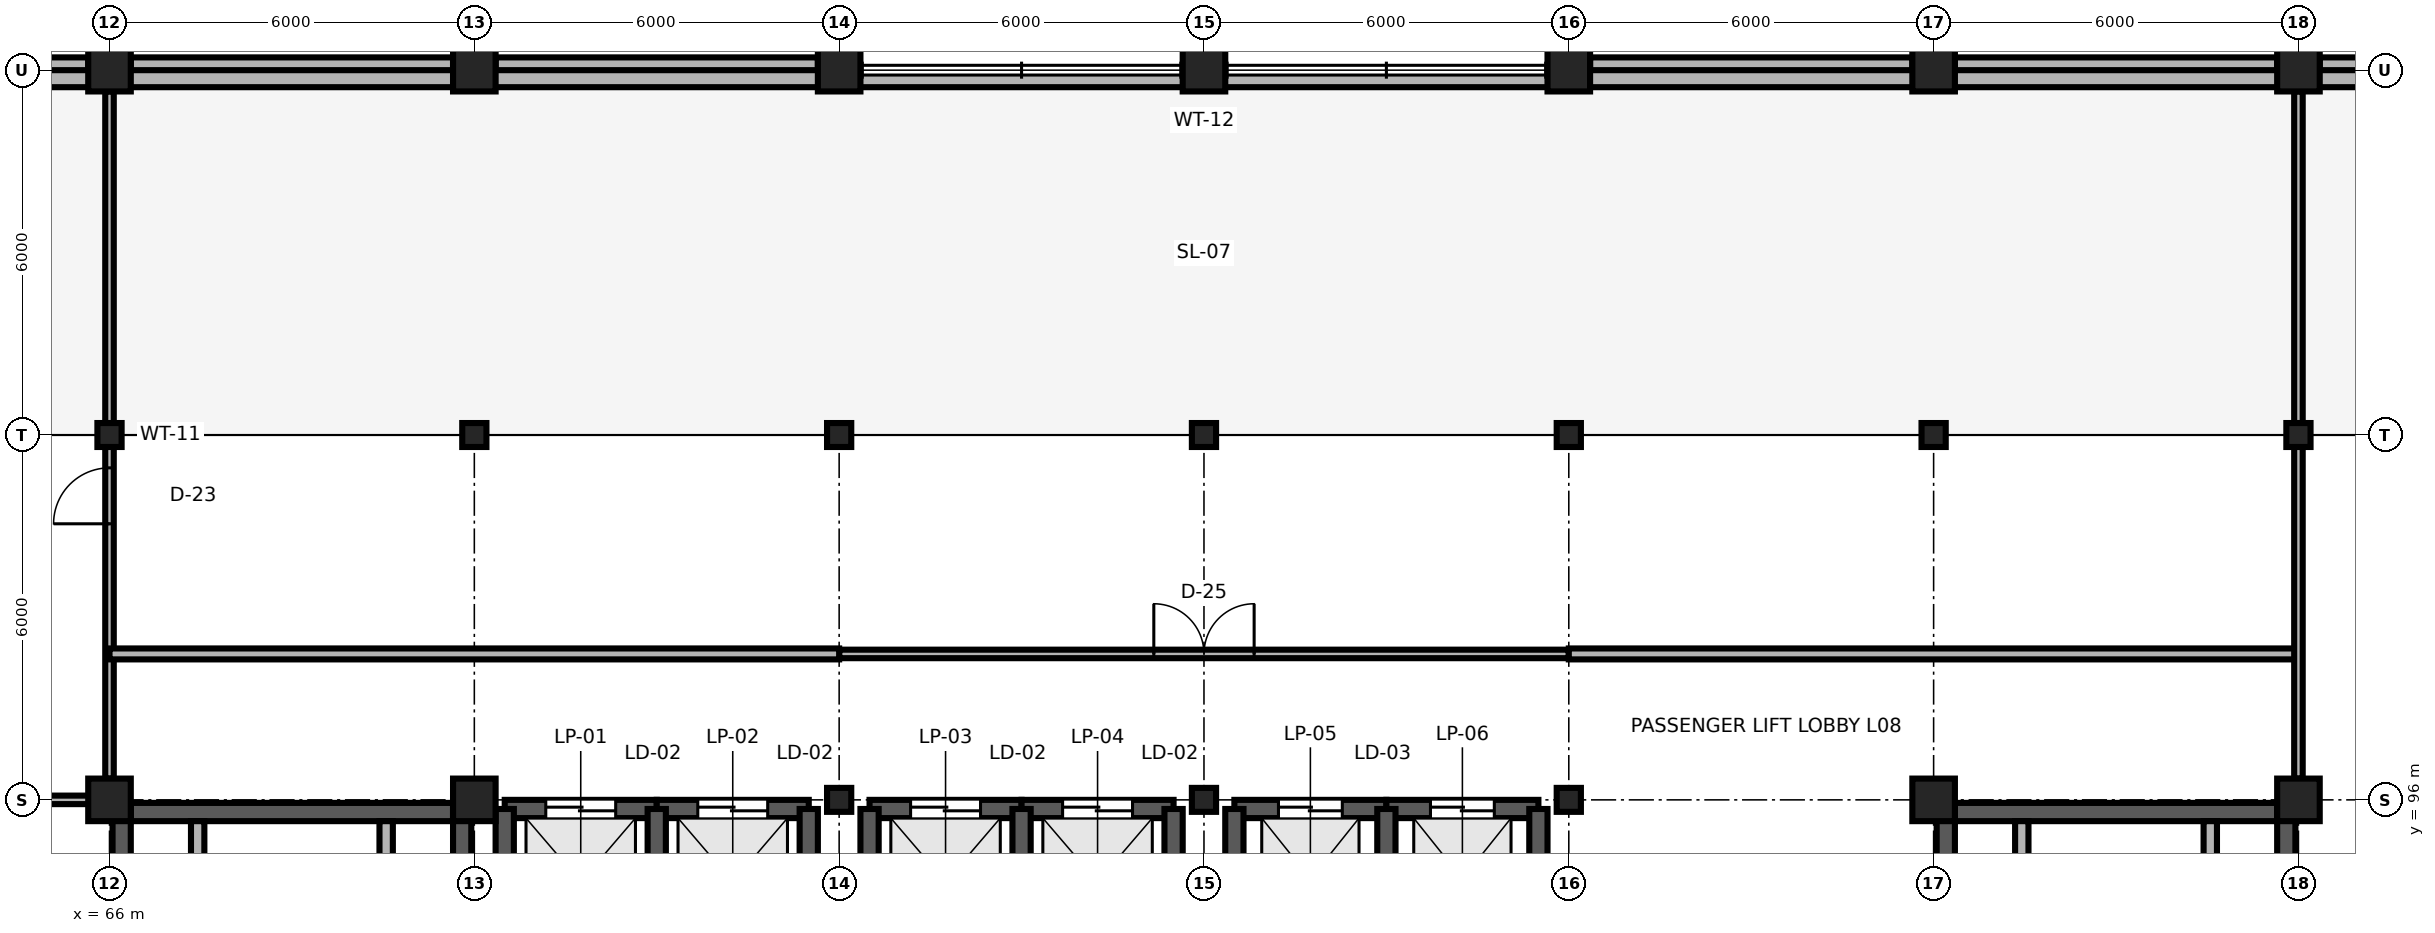
"""IFC4 building model, lengths in metres.
Left out: names, types, materials, properties, quantities, classifications, styles, units other than length and angle.
Written with IfcOpenShell. Run it as: python <this file> out.ifc"""

import sys

from ifc_helpers import new_model, si_unit, direction, frame, frame_2d, origin, origin_2d, place, context, subcontext, project, spatial, rectangle, i_section, extrude, element, fill, save


model = new_model("IFC4")
c1 = context("Model", 3, precision=1e-05, world=origin(), true_north=direction((0.0, 1.0)))
c2 = subcontext(c1, "Body", "Model", "MODEL_VIEW")
j1 = project(units=[si_unit("LENGTHUNIT", "METRE"), si_unit("PLANEANGLEUNIT", "RADIAN")], contexts=[c1])
p1 = place(None, origin())
s1 = spatial("IfcSite", under=j1, at=p1, CompositionType="ELEMENT")
p2 = place(p1, origin())
s2 = spatial("IfcBuilding", under=s1, at=p2, CompositionType="ELEMENT")
p3 = place(p2, frame((0.0, 0.0, 32.7)))
s3 = spatial("IfcBuildingStorey", under=s2, at=p3, CompositionType="ELEMENT", Elevation=32.7)
for number, where, z_axis, x_axis in (
    (1, (66.0, 96.0, 0.0), (0.0, 0.0, 1.0), (1.0, 0.0, 0.0)),
    (2, (72.0, 96.0, 0.0), (0.0, 0.0, 1.0), (1.0, 0.0, 0.0)),
):
    element("IfcColumn", number, at=place(p3, frame(where, z_axis=z_axis, x_axis=x_axis)), inside=s3, PredefinedType="COLUMN", context=c2, shape_type="SweptSolid", body=[
        extrude(rectangle(XDim=0.7, YDim=0.7, at=origin_2d()), origin(), (0.0, 0.0, 1.0), 3.9),
    ])
for number, where, z_axis, x_axis in (
    (3, (78.0, 96.0, 0.0), (0.0, 0.0, 1.0), (1.0, 0.0, 0.0)),
    (4, (84.0, 96.0, 0.0), (0.0, 0.0, 1.0), (1.0, 0.0, 0.0)),
    (5, (90.0, 96.0, 0.0), (0.0, 0.0, 1.0), (1.0, 0.0, 0.0)),
):
    element("IfcColumn", number, at=place(p3, frame(where, z_axis=z_axis, x_axis=x_axis)), inside=s3, PredefinedType="COLUMN", context=c2, shape_type="SweptSolid", body=[
        extrude(i_section(OverallWidth=0.398, OverallDepth=0.394, WebThickness=0.011, FlangeThickness=0.018, FilletRadius=0.022, at=origin_2d()), origin(), (0.0, 0.0, 1.0), 3.9),
    ])
for number, where, z_axis, x_axis in (
    (6, (96.0, 96.0, 0.0), (0.0, 0.0, 1.0), (1.0, 0.0, 0.0)),
    (7, (102.0, 96.0, 0.0), (0.0, 0.0, 1.0), (1.0, 0.0, 0.0)),
):
    element("IfcColumn", number, at=place(p3, frame(where, z_axis=z_axis, x_axis=x_axis)), inside=s3, PredefinedType="COLUMN", context=c2, shape_type="SweptSolid", body=[
        extrude(rectangle(XDim=0.7, YDim=0.7, at=origin_2d()), origin(), (0.0, 0.0, 1.0), 3.9),
    ])
for number, where, z_axis, x_axis in (
    (8, (66.0, 102.0, 0.0), (0.0, 0.0, 1.0), (1.0, 0.0, 0.0)),
    (9, (72.0, 102.0, 0.0), (0.0, 0.0, 1.0), (1.0, 0.0, 0.0)),
    (10, (78.0, 102.0, 0.0), (0.0, 0.0, 1.0), (1.0, 0.0, 0.0)),
    (11, (84.0, 102.0, 0.0), (0.0, 0.0, 1.0), (1.0, 0.0, 0.0)),
    (12, (90.0, 102.0, 0.0), (0.0, 0.0, 1.0), (1.0, 0.0, 0.0)),
    (13, (96.0, 102.0, 0.0), (0.0, 0.0, 1.0), (1.0, 0.0, 0.0)),
    (14, (102.0, 102.0, 0.0), (0.0, 0.0, 1.0), (1.0, 0.0, 0.0)),
):
    element("IfcColumn", number, at=place(p3, frame(where, z_axis=z_axis, x_axis=x_axis)), inside=s3, PredefinedType="COLUMN", context=c2, shape_type="SweptSolid", body=[
        extrude(i_section(OverallWidth=0.398, OverallDepth=0.394, WebThickness=0.011, FlangeThickness=0.018, FilletRadius=0.022, at=origin_2d()), origin(), (0.0, 0.0, 1.0), 3.9),
    ])
for number, where, z_axis, x_axis in (
    (15, (66.0, 108.0, 0.0), (0.0, 0.0, 1.0), (1.0, 0.0, 0.0)),
    (16, (72.0, 108.0, 0.0), (0.0, 0.0, 1.0), (1.0, 0.0, 0.0)),
    (17, (78.0, 108.0, 0.0), (0.0, 0.0, 1.0), (1.0, 0.0, 0.0)),
    (18, (84.0, 108.0, 0.0), (0.0, 0.0, 1.0), (1.0, 0.0, 0.0)),
    (19, (90.0, 108.0, 0.0), (0.0, 0.0, 1.0), (1.0, 0.0, 0.0)),
    (20, (96.0, 108.0, 0.0), (0.0, 0.0, 1.0), (1.0, 0.0, 0.0)),
    (21, (102.0, 108.0, 0.0), (0.0, 0.0, 1.0), (1.0, 0.0, 0.0)),
):
    element("IfcColumn", number, at=place(p3, frame(where, z_axis=z_axis, x_axis=x_axis)), inside=s3, PredefinedType="COLUMN", context=c2, shape_type="SweptSolid", body=[
        extrude(rectangle(XDim=0.7, YDim=0.7, at=origin_2d()), origin(), (0.0, 0.0, 1.0), 3.4),
    ])
for number, where, z_axis, x_axis in (
    (22, (60.35, 108.0, 0.0), (0.0, 0.0, 1.0), (1.0, 0.0, 0.0)),
    (23, (66.35, 108.0, 0.0), (0.0, 0.0, 1.0), (1.0, 0.0, 0.0)),
    (24, (72.35, 108.0, 0.0), (0.0, 0.0, 1.0), (1.0, 0.0, 0.0)),
    (25, (90.35, 108.0, 0.0), (0.0, 0.0, 1.0), (1.0, 0.0, 0.0)),
    (26, (96.35, 108.0, 0.0), (0.0, 0.0, 1.0), (1.0, 0.0, 0.0)),
    (27, (102.35, 108.0, 0.0), (0.0, 0.0, 1.0), (1.0, 0.0, 0.0)),
):
    element("IfcWall", number, at=place(p3, frame(where, z_axis=z_axis, x_axis=x_axis)), inside=s3, PredefinedType="SOLIDWALL", context=c2, shape_type="SweptSolid", body=[
        extrude(rectangle(XDim=5.3, YDim=0.42, at=frame_2d((2.65, 0.0))), origin(), (0.0, 0.0, 1.0), 2.98),
    ])
p4 = place(p3, frame((54.0, 107.86, 3.6), z_axis=(0.0, 0.0, 1.0), x_axis=(1.0, 0.0, 0.0)))
e28 = element("IfcWall", 28, at=p4, inside=s3, PredefinedType="PARAPET", context=c2, shape_type="SweptSolid", body=[
    extrude(rectangle(XDim=60.0, YDim=0.28, at=frame_2d((30.0, 0.0))), origin(), (0.0, 0.0, 1.0), 0.85),
])
p5 = place(p3, frame((66.35, 95.8, 0.0), z_axis=(0.0, 0.0, 1.0), x_axis=(1.0, 0.0, 0.0)))
e29 = element("IfcWall", 29, at=p5, inside=s3, PredefinedType="SHEAR", context=c2, shape_type="SweptSolid", body=[
    extrude(rectangle(XDim=5.3, YDim=0.3, at=frame_2d((2.65, 0.0))), origin(), (0.0, 0.0, 1.0), 3.74),
])
for number, where, z_axis, x_axis in (
    (30, (66.2, 84.0, 0.0), (0.0, 0.0, 1.0), (0.0, 1.0, 0.0)),
    (31, (71.8, 84.0, 0.0), (0.0, 0.0, 1.0), (0.0, 1.0, 0.0)),
):
    element("IfcWall", number, at=place(p3, frame(where, z_axis=z_axis, x_axis=x_axis)), inside=s3, PredefinedType="SHEAR", context=c2, shape_type="SweptSolid", body=[
        extrude(rectangle(XDim=11.8, YDim=0.3, at=frame_2d((5.9, 0.0))), origin(), (0.0, 0.0, 1.0), 3.74),
    ])
for number, where, z_axis, x_axis in (
    (32, (67.45, 94.4, 0.0), (0.0, 0.0, 1.0), (0.0, 1.0, 0.0)),
    (33, (70.55, 94.4, 0.0), (0.0, 0.0, 1.0), (0.0, 1.0, 0.0)),
):
    element("IfcWall", number, at=place(p3, frame(where, z_axis=z_axis, x_axis=x_axis)), inside=s3, PredefinedType="PARTITIONING", context=c2, shape_type="SweptSolid", body=[
        extrude(rectangle(XDim=1.25, YDim=0.22, at=frame_2d((0.625, 0.0))), origin(), (0.0, 0.0, 1.0), 3.74),
    ])
p6 = place(p3, frame((96.35, 95.8, 0.0), z_axis=(0.0, 0.0, 1.0), x_axis=(1.0, 0.0, 0.0)))
e34 = element("IfcWall", 34, at=p6, inside=s3, PredefinedType="SHEAR", context=c2, shape_type="SweptSolid", body=[
    extrude(rectangle(XDim=5.3, YDim=0.3, at=frame_2d((2.65, 0.0))), origin(), (0.0, 0.0, 1.0), 3.74),
])
for number, where, z_axis, x_axis in (
    (35, (96.2, 84.0, 0.0), (0.0, 0.0, 1.0), (0.0, 1.0, 0.0)),
    (36, (101.8, 84.0, 0.0), (0.0, 0.0, 1.0), (0.0, 1.0, 0.0)),
):
    element("IfcWall", number, at=place(p3, frame(where, z_axis=z_axis, x_axis=x_axis)), inside=s3, PredefinedType="SHEAR", context=c2, shape_type="SweptSolid", body=[
        extrude(rectangle(XDim=11.8, YDim=0.3, at=frame_2d((5.9, 0.0))), origin(), (0.0, 0.0, 1.0), 3.74),
    ])
for number, where, z_axis, x_axis in (
    (37, (97.45, 94.4, 0.0), (0.0, 0.0, 1.0), (0.0, 1.0, 0.0)),
    (38, (100.55, 94.4, 0.0), (0.0, 0.0, 1.0), (0.0, 1.0, 0.0)),
):
    element("IfcWall", number, at=place(p3, frame(where, z_axis=z_axis, x_axis=x_axis)), inside=s3, PredefinedType="PARTITIONING", context=c2, shape_type="SweptSolid", body=[
        extrude(rectangle(XDim=1.25, YDim=0.22, at=frame_2d((0.625, 0.0))), origin(), (0.0, 0.0, 1.0), 3.74),
    ])
p7 = place(p3, frame((72.5, 95.85, 0.0), z_axis=(0.0, 0.0, 1.0), x_axis=(1.0, 0.0, 0.0)))
e39 = element("IfcWall", 39, at=p7, inside=s3, PredefinedType="SHEAR", context=c2, shape_type="SweptSolid", body=[
    extrude(rectangle(XDim=2.5, YDim=0.3, at=frame_2d((1.25, 0.0))), origin(), (0.0, 0.0, 1.0), 3.74),
])
p8 = place(p7, frame((0.675, 0.0, 0.0)))
e40 = element("IfcOpeningElement", 40, at=p8, cuts=e39, PredefinedType="OPENING", context=c2, shape_type="SweptSolid", body=[
    extrude(rectangle(XDim=1.15, YDim=2.15, at=frame_2d((0.575, 1.075))), frame((0.0, 0.165, 0.0), z_axis=(0.0, -1.0, 0.0), x_axis=(1.0, 0.0, 0.0)), (0.0, 0.0, 1.0), 0.33),
])
p9 = place(p3, frame((72.5, 92.45, 0.0), z_axis=(0.0, 0.0, 1.0), x_axis=(0.0, 1.0, 0.0)))
e41 = element("IfcWall", 41, at=p9, inside=s3, PredefinedType="SHEAR", context=c2, shape_type="SweptSolid", body=[
    extrude(rectangle(XDim=3.4, YDim=0.3, at=frame_2d((1.7, 0.0))), origin(), (0.0, 0.0, 1.0), 3.74),
])
p10 = place(p3, frame((75.0, 95.85, 0.0), z_axis=(0.0, 0.0, 1.0), x_axis=(1.0, 0.0, 0.0)))
e42 = element("IfcWall", 42, at=p10, inside=s3, PredefinedType="SHEAR", context=c2, shape_type="SweptSolid", body=[
    extrude(rectangle(XDim=2.5, YDim=0.3, at=frame_2d((1.25, 0.0))), origin(), (0.0, 0.0, 1.0), 3.74),
])
p11 = place(p10, frame((0.675, 0.0, 0.0)))
e43 = element("IfcOpeningElement", 43, at=p11, cuts=e42, PredefinedType="OPENING", context=c2, shape_type="SweptSolid", body=[
    extrude(rectangle(XDim=1.15, YDim=2.15, at=frame_2d((0.575, 1.075))), frame((0.0, 0.165, 0.0), z_axis=(0.0, -1.0, 0.0), x_axis=(1.0, 0.0, 0.0)), (0.0, 0.0, 1.0), 0.33),
])
for number, where, z_axis, x_axis in (
    (44, (75.0, 92.45, 0.0), (0.0, 0.0, 1.0), (0.0, 1.0, 0.0)),
    (45, (77.5, 92.45, 0.0), (0.0, 0.0, 1.0), (0.0, 1.0, 0.0)),
):
    element("IfcWall", number, at=place(p3, frame(where, z_axis=z_axis, x_axis=x_axis)), inside=s3, PredefinedType="SHEAR", context=c2, shape_type="SweptSolid", body=[
        extrude(rectangle(XDim=3.4, YDim=0.3, at=frame_2d((1.7, 0.0))), origin(), (0.0, 0.0, 1.0), 3.74),
    ])
p12 = place(p3, frame((78.5, 95.85, 0.0), z_axis=(0.0, 0.0, 1.0), x_axis=(1.0, 0.0, 0.0)))
e46 = element("IfcWall", 46, at=p12, inside=s3, PredefinedType="SHEAR", context=c2, shape_type="SweptSolid", body=[
    extrude(rectangle(XDim=2.5, YDim=0.3, at=frame_2d((1.25, 0.0))), origin(), (0.0, 0.0, 1.0), 3.74),
])
p13 = place(p12, frame((0.675, 0.0, 0.0)))
e47 = element("IfcOpeningElement", 47, at=p13, cuts=e46, PredefinedType="OPENING", context=c2, shape_type="SweptSolid", body=[
    extrude(rectangle(XDim=1.15, YDim=2.15, at=frame_2d((0.575, 1.075))), frame((0.0, 0.165, 0.0), z_axis=(0.0, -1.0, 0.0), x_axis=(1.0, 0.0, 0.0)), (0.0, 0.0, 1.0), 0.33),
])
p14 = place(p3, frame((78.5, 92.45, 0.0), z_axis=(0.0, 0.0, 1.0), x_axis=(0.0, 1.0, 0.0)))
e48 = element("IfcWall", 48, at=p14, inside=s3, PredefinedType="SHEAR", context=c2, shape_type="SweptSolid", body=[
    extrude(rectangle(XDim=3.4, YDim=0.3, at=frame_2d((1.7, 0.0))), origin(), (0.0, 0.0, 1.0), 3.74),
])
p15 = place(p3, frame((81.0, 95.85, 0.0), z_axis=(0.0, 0.0, 1.0), x_axis=(1.0, 0.0, 0.0)))
e49 = element("IfcWall", 49, at=p15, inside=s3, PredefinedType="SHEAR", context=c2, shape_type="SweptSolid", body=[
    extrude(rectangle(XDim=2.5, YDim=0.3, at=frame_2d((1.25, 0.0))), origin(), (0.0, 0.0, 1.0), 3.74),
])
p16 = place(p15, frame((0.675, 0.0, 0.0)))
e50 = element("IfcOpeningElement", 50, at=p16, cuts=e49, PredefinedType="OPENING", context=c2, shape_type="SweptSolid", body=[
    extrude(rectangle(XDim=1.15, YDim=2.15, at=frame_2d((0.575, 1.075))), frame((0.0, 0.165, 0.0), z_axis=(0.0, -1.0, 0.0), x_axis=(1.0, 0.0, 0.0)), (0.0, 0.0, 1.0), 0.33),
])
for number, where, z_axis, x_axis in (
    (51, (81.0, 92.45, 0.0), (0.0, 0.0, 1.0), (0.0, 1.0, 0.0)),
    (52, (83.5, 92.45, 0.0), (0.0, 0.0, 1.0), (0.0, 1.0, 0.0)),
):
    element("IfcWall", number, at=place(p3, frame(where, z_axis=z_axis, x_axis=x_axis)), inside=s3, PredefinedType="SHEAR", context=c2, shape_type="SweptSolid", body=[
        extrude(rectangle(XDim=3.4, YDim=0.3, at=frame_2d((1.7, 0.0))), origin(), (0.0, 0.0, 1.0), 3.74),
    ])
p17 = place(p3, frame((84.5, 95.85, 0.0), z_axis=(0.0, 0.0, 1.0), x_axis=(1.0, 0.0, 0.0)))
e53 = element("IfcWall", 53, at=p17, inside=s3, PredefinedType="SHEAR", context=c2, shape_type="SweptSolid", body=[
    extrude(rectangle(XDim=2.5, YDim=0.3, at=frame_2d((1.25, 0.0))), origin(), (0.0, 0.0, 1.0), 3.74),
])
p18 = place(p17, frame((0.725, 0.0, 0.0)))
e54 = element("IfcOpeningElement", 54, at=p18, cuts=e53, PredefinedType="OPENING", context=c2, shape_type="SweptSolid", body=[
    extrude(rectangle(XDim=1.05, YDim=2.1, at=frame_2d((0.525, 1.05))), frame((0.0, 0.165, 0.0), z_axis=(0.0, -1.0, 0.0), x_axis=(1.0, 0.0, 0.0)), (0.0, 0.0, 1.0), 0.33),
])
p19 = place(p3, frame((84.5, 92.45, 0.0), z_axis=(0.0, 0.0, 1.0), x_axis=(0.0, 1.0, 0.0)))
e55 = element("IfcWall", 55, at=p19, inside=s3, PredefinedType="SHEAR", context=c2, shape_type="SweptSolid", body=[
    extrude(rectangle(XDim=3.4, YDim=0.3, at=frame_2d((1.7, 0.0))), origin(), (0.0, 0.0, 1.0), 3.74),
])
p20 = place(p3, frame((87.0, 95.85, 0.0), z_axis=(0.0, 0.0, 1.0), x_axis=(1.0, 0.0, 0.0)))
e56 = element("IfcWall", 56, at=p20, inside=s3, PredefinedType="SHEAR", context=c2, shape_type="SweptSolid", body=[
    extrude(rectangle(XDim=2.5, YDim=0.3, at=frame_2d((1.25, 0.0))), origin(), (0.0, 0.0, 1.0), 3.74),
])
p21 = place(p20, frame((0.725, 0.0, 0.0)))
e57 = element("IfcOpeningElement", 57, at=p21, cuts=e56, PredefinedType="OPENING", context=c2, shape_type="SweptSolid", body=[
    extrude(rectangle(XDim=1.05, YDim=2.1, at=frame_2d((0.525, 1.05))), frame((0.0, 0.165, 0.0), z_axis=(0.0, -1.0, 0.0), x_axis=(1.0, 0.0, 0.0)), (0.0, 0.0, 1.0), 0.33),
])
for number, where, z_axis, x_axis in (
    (58, (87.0, 92.45, 0.0), (0.0, 0.0, 1.0), (0.0, 1.0, 0.0)),
    (59, (89.5, 92.45, 0.0), (0.0, 0.0, 1.0), (0.0, 1.0, 0.0)),
):
    element("IfcWall", number, at=place(p3, frame(where, z_axis=z_axis, x_axis=x_axis)), inside=s3, PredefinedType="SHEAR", context=c2, shape_type="SweptSolid", body=[
        extrude(rectangle(XDim=3.4, YDim=0.3, at=frame_2d((1.7, 0.0))), origin(), (0.0, 0.0, 1.0), 3.74),
    ])
p22 = place(p3, frame((66.0, 96.35, 0.0), z_axis=(0.0, 0.0, 1.0), x_axis=(0.0, 1.0, 0.0)))
e60 = element("IfcWall", 60, at=p22, inside=s3, PredefinedType="PARTITIONING", context=c2, shape_type="SweptSolid", body=[
    extrude(rectangle(XDim=11.3, YDim=0.14, at=frame_2d((5.65, 0.0))), origin(), (0.0, 0.0, 1.0), 3.012),
])
p23 = place(p22, frame((4.19, 0.0, 0.0)))
e61 = element("IfcOpeningElement", 61, at=p23, cuts=e60, PredefinedType="OPENING", context=c2, shape_type="SweptSolid", body=[
    extrude(rectangle(XDim=0.92, YDim=2.15, at=frame_2d((0.46, 1.075))), frame((0.0, 0.085, 0.0), z_axis=(0.0, -1.0, 0.0), x_axis=(1.0, 0.0, 0.0)), (0.0, 0.0, 1.0), 0.17),
])
p24 = place(p3, frame((78.0, 98.4, 0.0), z_axis=(0.0, 0.0, 1.0), x_axis=(1.0, 0.0, 0.0)))
e62 = element("IfcWall", 62, at=p24, inside=s3, PredefinedType="PARTITIONING", context=c2, shape_type="SweptSolid", body=[
    extrude(rectangle(XDim=12.0, YDim=0.14, at=frame_2d((6.0, 0.0))), origin(), (0.0, 0.0, 1.0), 3.4),
])
p25 = place(p24, frame((5.175, 0.0, 0.0)))
e63 = element("IfcOpeningElement", 63, at=p25, cuts=e62, PredefinedType="OPENING", context=c2, shape_type="SweptSolid", body=[
    extrude(rectangle(XDim=1.65, YDim=2.35, at=frame_2d((0.825, 1.175))), frame((0.0, 0.085, 0.0), z_axis=(0.0, -1.0, 0.0), x_axis=(1.0, 0.0, 0.0)), (0.0, 0.0, 1.0), 0.17),
])
p26 = place(p3, frame((54.65, 96.0, 0.0), z_axis=(0.0, 0.0, 1.0), x_axis=(1.0, 0.0, 0.0)))
e64 = element("IfcWall", 64, at=p26, inside=s3, PredefinedType="PARTITIONING", context=c2, shape_type="SweptSolid", body=[
    extrude(rectangle(XDim=11.15, YDim=0.14, at=frame_2d((5.575, 0.0))), origin(), (0.0, 0.0, 1.0), 3.012),
])
for number, where, z_axis, x_axis in (
    (65, (66.0, 98.4, 0.0), (0.0, 0.0, 1.0), (1.0, 0.0, 0.0)),
    (66, (90.0, 98.4, 0.0), (0.0, 0.0, 1.0), (1.0, 0.0, 0.0)),
):
    element("IfcWall", number, at=place(p3, frame(where, z_axis=z_axis, x_axis=x_axis)), inside=s3, PredefinedType="PARTITIONING", context=c2, shape_type="SweptSolid", body=[
        extrude(rectangle(XDim=12.0, YDim=0.18, at=frame_2d((6.0, 0.0))), origin(), (0.0, 0.0, 1.0), 3.4),
    ])
p27 = place(p3, frame((102.0, 96.35, 0.0), z_axis=(0.0, 0.0, 1.0), x_axis=(0.0, 1.0, 0.0)))
e67 = element("IfcWall", 67, at=p27, inside=s3, PredefinedType="PARTITIONING", context=c2, shape_type="SweptSolid", body=[
    extrude(rectangle(XDim=11.3, YDim=0.14, at=frame_2d((5.65, 0.0))), origin(), (0.0, 0.0, 1.0), 3.012),
])
p28 = place(p8, origin())
e68 = element("IfcDoor", 68, at=p28, inside=s3, OperationType="DOUBLE_DOOR_SLIDING", PredefinedType="DOOR", context=c2, shape_type="SweptSolid", body=[
    extrude(rectangle(XDim=1.15, YDim=2.15, at=frame_2d((0.575, 1.075))), frame((0.0, 0.025, 0.0), z_axis=(0.0, -1.0, 0.0), x_axis=(1.0, 0.0, 0.0)), (0.0, 0.0, 1.0), 0.05),
])
fill(e40, e68)
p29 = place(p11, origin())
e69 = element("IfcDoor", 69, at=p29, inside=s3, OperationType="DOUBLE_DOOR_SLIDING", PredefinedType="DOOR", context=c2, shape_type="SweptSolid", body=[
    extrude(rectangle(XDim=1.15, YDim=2.15, at=frame_2d((0.575, 1.075))), frame((0.0, 0.025, 0.0), z_axis=(0.0, -1.0, 0.0), x_axis=(1.0, 0.0, 0.0)), (0.0, 0.0, 1.0), 0.05),
])
fill(e43, e69)
p30 = place(p13, origin())
e70 = element("IfcDoor", 70, at=p30, inside=s3, OperationType="DOUBLE_DOOR_SLIDING", PredefinedType="DOOR", context=c2, shape_type="SweptSolid", body=[
    extrude(rectangle(XDim=1.15, YDim=2.15, at=frame_2d((0.575, 1.075))), frame((0.0, 0.025, 0.0), z_axis=(0.0, -1.0, 0.0), x_axis=(1.0, 0.0, 0.0)), (0.0, 0.0, 1.0), 0.05),
])
fill(e47, e70)
p31 = place(p16, origin())
e71 = element("IfcDoor", 71, at=p31, inside=s3, OperationType="DOUBLE_DOOR_SLIDING", PredefinedType="DOOR", context=c2, shape_type="SweptSolid", body=[
    extrude(rectangle(XDim=1.15, YDim=2.15, at=frame_2d((0.575, 1.075))), frame((0.0, 0.025, 0.0), z_axis=(0.0, -1.0, 0.0), x_axis=(1.0, 0.0, 0.0)), (0.0, 0.0, 1.0), 0.05),
])
fill(e50, e71)
p32 = place(p18, origin())
e72 = element("IfcDoor", 72, at=p32, inside=s3, OperationType="DOUBLE_DOOR_SLIDING", PredefinedType="DOOR", context=c2, shape_type="SweptSolid", body=[
    extrude(rectangle(XDim=1.05, YDim=2.1, at=frame_2d((0.525, 1.05))), frame((0.0, 0.025, 0.0), z_axis=(0.0, -1.0, 0.0), x_axis=(1.0, 0.0, 0.0)), (0.0, 0.0, 1.0), 0.05),
])
fill(e54, e72)
p33 = place(p21, origin())
e73 = element("IfcDoor", 73, at=p33, inside=s3, OperationType="DOUBLE_DOOR_SLIDING", PredefinedType="DOOR", context=c2, shape_type="SweptSolid", body=[
    extrude(rectangle(XDim=1.05, YDim=2.1, at=frame_2d((0.525, 1.05))), frame((0.0, 0.025, 0.0), z_axis=(0.0, -1.0, 0.0), x_axis=(1.0, 0.0, 0.0)), (0.0, 0.0, 1.0), 0.05),
])
fill(e57, e73)
p34 = place(p23, origin())
e74 = element("IfcDoor", 74, at=p34, inside=s3, OperationType="SINGLE_SWING_LEFT", PredefinedType="DOOR", context=c2, shape_type="SweptSolid", body=[
    extrude(rectangle(XDim=0.92, YDim=2.15, at=frame_2d((0.46, 1.075))), frame((0.0, 0.025, 0.0), z_axis=(0.0, -1.0, 0.0), x_axis=(1.0, 0.0, 0.0)), (0.0, 0.0, 1.0), 0.05),
])
fill(e61, e74)
p35 = place(p25, origin())
e75 = element("IfcDoor", 75, at=p35, inside=s3, OperationType="DOUBLE_DOOR_SINGLE_SWING", PredefinedType="DOOR", context=c2, shape_type="SweptSolid", body=[
    extrude(rectangle(XDim=1.65, YDim=2.35, at=frame_2d((0.825, 1.175))), frame((0.0, 0.025, 0.0), z_axis=(0.0, -1.0, 0.0), x_axis=(1.0, 0.0, 0.0)), (0.0, 0.0, 1.0), 0.05),
])
fill(e63, e75)
save(model, sys.argv[1])
